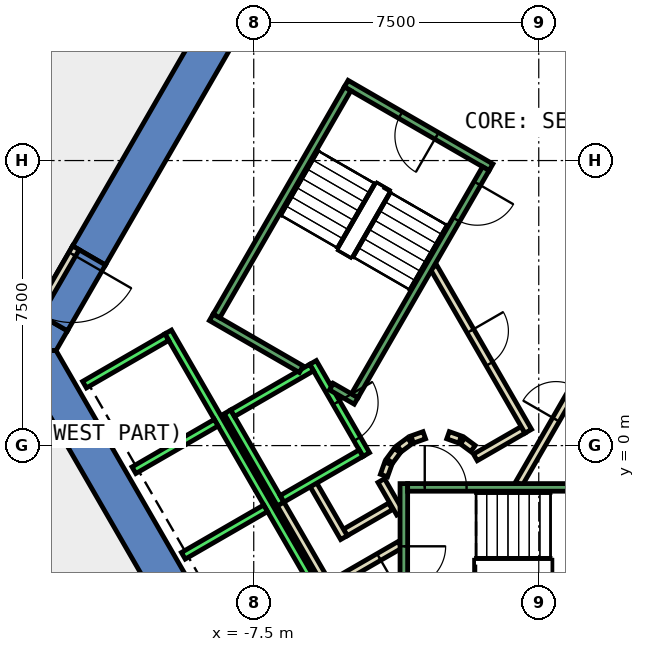
"""IFC4 building model, lengths in metres.
Left out: names, types, materials, properties, quantities, classifications, styles, units other than length and angle.
Written with IfcOpenShell. Run it as: python <this file> out.ifc"""

import sys

from ifc_helpers import new_model, si_unit, direction, frame, frame_2d, origin, place, context, subcontext, project, spatial, polyline, rectangle, outline, extrude, element, fill, save


model = new_model("IFC4")
c1 = context("Model", 3, precision=1e-05, world=origin(), true_north=direction((0.0, 1.0)))
c2 = subcontext(c1, "Body", "Model", "MODEL_VIEW")
j1 = project(units=[si_unit("LENGTHUNIT", "METRE"), si_unit("PLANEANGLEUNIT", "RADIAN")], contexts=[c1])
p1 = place(None, origin())
s1 = spatial("IfcSite", under=j1, at=p1, CompositionType="ELEMENT")
p2 = place(p1, origin())
s2 = spatial("IfcBuilding", under=s1, at=p2, CompositionType="ELEMENT")
p3 = place(p2, frame((0.0, 0.0, 25.0)))
s3 = spatial("IfcBuildingStorey", under=s2, at=p3, CompositionType="ELEMENT", Elevation=25.0)
p4 = place(p3, frame((0.0, 0.0, -0.45)))
e1 = element("IfcWall", 1, at=p4, inside=s3, PredefinedType="SHEAR", context=c2, shape_type="SweptSolid", body=[
    extrude(outline(polyline([(-12.267, 5.252), (-11.402, 4.752), (-6.351, 13.5), (-6.928, 14.5), (-12.267, 5.252)])), origin(), (0.0, 0.0, 1.0), 5.0),
])
p5 = place(p3, frame((0.0, 0.0, -0.45)))
e2 = element("IfcWall", 2, at=p5, inside=s3, PredefinedType="SHEAR", context=c2, shape_type="SweptSolid", body=[
    extrude(outline(polyline([(-12.402, 3.02), (-13.267, 3.52), (-13.856, 2.5), (-12.702, 2.5), (-12.402, 3.02)])), origin(), (0.0, 0.0, 1.0), 5.0),
])
p6 = place(p3, frame((0.0, 0.0, 3.6)))
e3 = element("IfcWall", 3, at=p6, inside=s3, PredefinedType="SHEAR", context=c2, shape_type="SweptSolid", body=[
    extrude(outline(polyline([(-13.267, 3.52), (-12.402, 3.02), (-11.402, 4.752), (-12.267, 5.252), (-13.267, 3.52)])), origin(), (0.0, 0.0, 1.0), 0.95),
])
p7 = place(p3, frame((0.0, 0.0, -0.45)))
e4 = element("IfcWall", 4, at=p7, inside=s3, PredefinedType="SHEAR", context=c2, shape_type="SweptSolid", body=[
    extrude(outline(polyline([(-13.856, 2.5), (-6.928, -9.5), (-6.351, -8.5), (-12.702, 2.5), (-13.856, 2.5)])), origin(), (0.0, 0.0, 1.0), 5.0),
])
p8 = place(p3, frame((-3.9, -1.599, 0.0), z_axis=(0.0, 0.0, 1.0), x_axis=(-0.865969445389, -0.500096910261, 0.0)))
e5 = element("IfcWall", 5, at=p8, inside=s3, PredefinedType="PARTITIONING", context=c2, shape_type="SweptSolid", body=[
    extrude(rectangle(XDim=1.373, YDim=0.2, at=frame_2d((0.687, 0.0))), origin(), (0.0, 0.0, 1.0), 4.55),
])
p9 = place(p3, frame((-5.126, -2.422, 0.0), z_axis=(0.0, 0.0, 1.0), x_axis=(-0.500062241894, 0.865989465428, 0.0)))
e6 = element("IfcWall", 6, at=p9, inside=s3, PredefinedType="PARTITIONING", context=c2, shape_type="SweptSolid", body=[
    extrude(rectangle(XDim=1.7, YDim=0.2, at=frame_2d((0.85, 0.0))), origin(), (0.0, 0.0, 1.0), 4.55),
])
p10 = place(p3, frame((-5.492, -3.788, 0.0), z_axis=(0.0, 0.0, 1.0), x_axis=(-0.500008949224, 0.866020236886, 0.0)))
e7 = element("IfcWall", 7, at=p10, inside=s3, PredefinedType="PARTITIONING", context=c2, shape_type="SweptSolid", body=[
    extrude(rectangle(XDim=2.68, YDim=0.2, at=frame_2d((1.34, 0.0))), origin(), (0.0, 0.0, 1.0), 4.55),
])
p11 = place(p3, frame((-4.145, -0.92, 0.0), z_axis=(0.0, 0.0, 1.0), x_axis=(0.499743786207, -0.866173278362, 0.0)))
e8 = element("IfcWall", 8, at=p11, inside=s3, PredefinedType="PARTITIONING", context=c2, shape_type="SweptSolid", body=[
    extrude(rectangle(XDim=0.991, YDim=0.2, at=frame_2d((0.495, 0.0))), origin(), (0.0, 0.0, 1.0), 4.55),
])
p12 = place(p3, frame((-3.65, -2.61, 0.0), z_axis=(0.0, 0.0, 1.0), x_axis=(-0.866072462134, -0.499918483688, 0.0)))
e9 = element("IfcWall", 9, at=p12, inside=s3, PredefinedType="PARTITIONING", context=c2, shape_type="SweptSolid", body=[
    extrude(rectangle(XDim=2.084, YDim=0.2, at=frame_2d((1.042, 0.0))), origin(), (0.0, 0.0, 1.0), 4.55),
])
p13 = place(p12, frame((0.642, 0.0, 0.0)))
e10 = element("IfcOpeningElement", 10, at=p13, cuts=e9, PredefinedType="OPENING", context=c2, shape_type="SweptSolid", body=[
    extrude(rectangle(XDim=0.9, YDim=2.1, at=frame_2d((0.45, 1.05))), frame((0.0, 0.11, 0.0), z_axis=(0.0, -1.0, 0.0), x_axis=(1.0, 0.0, 0.0)), (0.0, 0.0, 1.0), 0.22),
])
p14 = place(p3, frame((-0.52, -1.0, 0.0), z_axis=(0.0, 0.0, 1.0), x_axis=(0.50011622646, 0.865958290007, 0.0)))
e11 = element("IfcWall", 11, at=p14, inside=s3, PredefinedType="PARTITIONING", context=c2, shape_type="SweptSolid", body=[
    extrude(rectangle(XDim=4.991, YDim=0.2, at=frame_2d((2.496, 0.0))), origin(), (0.0, 0.0, 1.0), 4.55),
])
p15 = place(p14, frame((1.945, 0.0, 0.0)))
e12 = element("IfcOpeningElement", 12, at=p15, cuts=e11, PredefinedType="OPENING", context=c2, shape_type="SweptSolid", body=[
    extrude(rectangle(XDim=1.0, YDim=2.1, at=frame_2d((0.5, 1.05))), frame((0.0, 0.11, 0.0), z_axis=(0.0, -1.0, 0.0), x_axis=(1.0, 0.0, 0.0)), (0.0, 0.0, 1.0), 0.22),
])
p16 = place(p3, frame((-0.412, 0.414, 0.0), z_axis=(0.0, 0.0, 1.0), x_axis=(-0.866017369001, -0.500013916395, 0.0)))
e13 = element("IfcWall", 13, at=p16, inside=s3, PredefinedType="PARTITIONING", context=c2, shape_type="SweptSolid", body=[
    extrude(rectangle(XDim=1.45, YDim=0.2, at=frame_2d((0.725, 0.0))), origin(), (0.0, 0.0, 1.0), 4.55),
])
p17 = place(p3, frame((-1.731, -0.077, 0.0), z_axis=(0.0, 0.0, 1.0), x_axis=(-0.804311165252, 0.594208338422, 0.0)))
e14 = element("IfcWall", 14, at=p17, inside=s3, PredefinedType="PARTITIONING", context=c2, shape_type="SweptSolid", body=[
    extrude(rectangle(XDim=0.338, YDim=0.2, at=frame_2d((0.169, 0.0))), origin(), (0.0, 0.0, 1.0), 4.55),
])
p18 = place(p3, frame((-2.07, 0.16, 0.0), z_axis=(0.0, 0.0, 1.0), x_axis=(-0.942199461132, 0.335052496547, 0.0)))
e15 = element("IfcWall", 15, at=p18, inside=s3, PredefinedType="PARTITIONING", context=c2, shape_type="SweptSolid", body=[
    extrude(rectangle(XDim=0.337, YDim=0.2, at=frame_2d((0.169, 0.0))), origin(), (0.0, 0.0, 1.0), 4.55),
])
p19 = place(p3, frame((-3.012, 0.273, 0.0), z_axis=(0.0, 0.0, 1.0), x_axis=(-0.942280615813, -0.334824194261, 0.0)))
e16 = element("IfcWall", 16, at=p19, inside=s3, PredefinedType="PARTITIONING", context=c2, shape_type="SweptSolid", body=[
    extrude(rectangle(XDim=0.338, YDim=0.2, at=frame_2d((0.169, 0.0))), origin(), (0.0, 0.0, 1.0), 4.55),
])
p20 = place(p3, frame((-3.397, 0.124, 0.0), z_axis=(0.0, 0.0, 1.0), x_axis=(-0.804311165252, -0.594208338422, 0.0)))
e17 = element("IfcWall", 17, at=p20, inside=s3, PredefinedType="PARTITIONING", context=c2, shape_type="SweptSolid", body=[
    extrude(rectangle(XDim=0.338, YDim=0.2, at=frame_2d((0.169, 0.0))), origin(), (0.0, 0.0, 1.0), 4.55),
])
p21 = place(p3, frame((-3.723, -0.131, 0.0), z_axis=(0.0, 0.0, 1.0), x_axis=(-0.594675113454, -0.803966112121, 0.0)))
e18 = element("IfcWall", 18, at=p21, inside=s3, PredefinedType="PARTITIONING", context=c2, shape_type="SweptSolid", body=[
    extrude(rectangle(XDim=0.338, YDim=0.2, at=frame_2d((0.169, 0.0))), origin(), (0.0, 0.0, 1.0), 4.55),
])
p22 = place(p3, frame((-3.96, -0.47, 0.0), z_axis=(0.0, 0.0, 1.0), x_axis=(-0.334824194261, -0.942280615813, 0.0)))
e19 = element("IfcWall", 19, at=p22, inside=s3, PredefinedType="PARTITIONING", context=c2, shape_type="SweptSolid", body=[
    extrude(rectangle(XDim=0.338, YDim=0.2, at=frame_2d((0.169, 0.0))), origin(), (0.0, 0.0, 1.0), 4.55),
])
p23 = place(p3, frame((-2.771, 4.7, 0.0), z_axis=(0.0, 0.0, 1.0), x_axis=(0.499969479948, -0.866043023828, 0.0)))
e20 = element("IfcWall", 20, at=p23, inside=s3, PredefinedType="PARTITIONING", context=c2, shape_type="SweptSolid", body=[
    extrude(rectangle(XDim=4.99, YDim=0.2, at=frame_2d((2.495, 0.0))), origin(), (0.0, 0.0, 1.0), 4.55),
])
p24 = place(p23, frame((1.945, 0.0, 0.0)))
e21 = element("IfcOpeningElement", 21, at=p24, cuts=e20, PredefinedType="OPENING", context=c2, shape_type="SweptSolid", body=[
    extrude(rectangle(XDim=1.0, YDim=2.1, at=frame_2d((0.5, 1.05))), frame((0.0, 0.11, 0.0), z_axis=(0.0, -1.0, 0.0), x_axis=(1.0, 0.0, 0.0)), (0.0, 0.0, 1.0), 0.22),
])
p25 = place(p3, frame((-12.18, 5.202, 0.0), z_axis=(0.0, 0.0, 1.0), x_axis=(-0.50002537861, -0.866010750942, 0.0)))
e22 = element("IfcWall", 22, at=p25, inside=s3, PredefinedType="PARTITIONING", context=c2, shape_type="SweptSolid", body=[
    extrude(rectangle(XDim=2.0, YDim=0.2, at=frame_2d((1.0, 0.0))), origin(), (0.0, 0.0, 1.0), 2.4),
])
p26 = place(p25, frame((0.19, 0.0, 0.0)))
e23 = element("IfcOpeningElement", 23, at=p26, cuts=e22, PredefinedType="OPENING", context=c2, shape_type="SweptSolid", body=[
    extrude(rectangle(XDim=1.8, YDim=2.1, at=frame_2d((0.9, 1.05))), frame((0.0, 0.11, 0.0), z_axis=(0.0, -1.0, 0.0), x_axis=(1.0, 0.0, 0.0)), (0.0, 0.0, 1.0), 0.22),
])
p27 = place(p3, frame((-5.94, 2.188, 0.0), z_axis=(0.0, 0.0, 1.0), x_axis=(0.49994636267, -0.866056369097, 0.0)))
e24 = element("IfcWall", 24, at=p27, inside=s3, PredefinedType="STANDARD", context=c2, shape_type="SweptSolid", body=[
    extrude(rectangle(XDim=2.8, YDim=0.2, at=frame_2d((1.4, 0.0))), origin(), (0.0, 0.0, 1.0), 4.55),
])
p28 = place(p27, frame((1.225, 0.0, 0.0)))
e25 = element("IfcOpeningElement", 25, at=p28, cuts=e24, PredefinedType="OPENING", context=c2, shape_type="SweptSolid", body=[
    extrude(rectangle(XDim=1.1, YDim=2.1, at=frame_2d((0.55, 1.05))), frame((0.0, 0.11, 0.0), z_axis=(0.0, -1.0, 0.0), x_axis=(1.0, 0.0, 0.0)), (0.0, 0.0, 1.0), 0.22),
])
p29 = place(p3, frame((-8.192, 0.888, 0.0), z_axis=(0.0, 0.0, 1.0), x_axis=(0.49994636267, -0.866056369097, 0.0)))
e26 = element("IfcWall", 26, at=p29, inside=s3, PredefinedType="STANDARD", context=c2, shape_type="SweptSolid", body=[
    extrude(rectangle(XDim=2.8, YDim=0.2, at=frame_2d((1.4, 0.0))), origin(), (0.0, 0.0, 1.0), 4.55),
])
for number, where, z_axis, x_axis in (
    (27, (-5.977, 2.052, 0.0), (0.0, 0.0, 1.0), (-0.866, -0.5, 0.0)),
    (28, (-4.677, -0.2, 0.0), (0.0, 0.0, 1.0), (-0.866, -0.5, 0.0)),
):
    element("IfcWall", number, at=place(p3, frame(where, z_axis=z_axis, x_axis=x_axis)), inside=s3, PredefinedType="STANDARD", context=c2, shape_type="SweptSolid", body=[
        extrude(rectangle(XDim=2.399, YDim=0.2, at=frame_2d((1.2, 0.0))), origin(), (0.0, 0.0, 1.0), 4.55),
    ])
p30 = place(p3, frame((-9.751, 2.99, 0.0), z_axis=(0.0, 0.0, 1.0), x_axis=(0.50000090737, -0.866024879913, 0.0)))
e29 = element("IfcWall", 29, at=p30, inside=s3, PredefinedType="STANDARD", context=c2, shape_type="SweptSolid", body=[
    extrude(rectangle(XDim=10.6, YDim=0.2, at=frame_2d((5.3, 0.0))), origin(), (0.0, 0.0, 1.0), 4.55),
])
p31 = place(p3, frame((-9.788, 2.853, 0.0), z_axis=(0.0, 0.0, 1.0), x_axis=(-0.865998541277, -0.500046524342, 0.0)))
e30 = element("IfcWall", 30, at=p31, inside=s3, PredefinedType="STANDARD", context=c2, shape_type="SweptSolid", body=[
    extrude(rectangle(XDim=2.5, YDim=0.2, at=frame_2d((1.25, 0.0))), origin(), (0.0, 0.0, 1.0), 4.55),
])
for number, where, z_axis, x_axis in (
    (31, (-8.488, 0.602, 0.0), (0.0, 0.0, 1.0), (-0.866, -0.5, 0.0)),
    (32, (-7.188, -1.65, 0.0), (0.0, 0.0, 1.0), (-0.866, -0.5, 0.0)),
):
    element("IfcWall", number, at=place(p3, frame(where, z_axis=z_axis, x_axis=x_axis)), inside=s3, PredefinedType="STANDARD", context=c2, shape_type="SweptSolid", body=[
        extrude(rectangle(XDim=2.5, YDim=0.2, at=frame_2d((1.25, 0.0))), origin(), (0.0, 0.0, 1.0), 4.55),
    ])
p32 = place(p3, frame((-3.55, -1.0, 0.0), z_axis=(0.0, 0.0, 1.0), x_axis=(0.0, -1.0, 0.0)))
e33 = element("IfcWall", 33, at=p32, inside=s3, PredefinedType="STANDARD", context=c2, shape_type="SweptSolid", body=[
    extrude(rectangle(XDim=4.4, YDim=0.2, at=frame_2d((2.2, 0.0))), origin(), (0.0, 0.0, 1.0), 4.55),
])
p33 = place(p32, frame((1.65, 0.0, 0.0)))
e34 = element("IfcOpeningElement", 34, at=p33, cuts=e33, PredefinedType="OPENING", context=c2, shape_type="SweptSolid", body=[
    extrude(rectangle(XDim=1.1, YDim=2.2, at=frame_2d((0.55, 1.1))), frame((0.0, 0.11, 0.0), z_axis=(0.0, -1.0, 0.0), x_axis=(1.0, 0.0, 0.0)), (0.0, 0.0, 1.0), 0.22),
])
p34 = place(p3, frame((-3.45, -1.1, 0.0), z_axis=(0.0, 0.0, 1.0), x_axis=(1.0, 0.0, 0.0)))
e35 = element("IfcWall", 35, at=p34, inside=s3, PredefinedType="STANDARD", context=c2, shape_type="SweptSolid", body=[
    extrude(rectangle(XDim=6.9, YDim=0.2, at=frame_2d((3.45, 0.0))), origin(), (0.0, 0.0, 1.0), 4.55),
])
p35 = place(p34, frame((0.45, 0.0, 0.0)))
e36 = element("IfcOpeningElement", 36, at=p35, cuts=e35, PredefinedType="OPENING", context=c2, shape_type="SweptSolid", body=[
    extrude(rectangle(XDim=1.1, YDim=2.2, at=frame_2d((0.55, 1.1))), frame((0.0, 0.11, 0.0), z_axis=(0.0, -1.0, 0.0), x_axis=(1.0, 0.0, 0.0)), (0.0, 0.0, 1.0), 0.22),
])
p36 = place(p3, frame((-1.256, 7.324, 0.0), z_axis=(0.0, 0.0, 1.0), x_axis=(-0.866046073146, 0.499964197906, 0.0)))
e37 = element("IfcWall", 37, at=p36, inside=s3, PredefinedType="STANDARD", context=c2, shape_type="SweptSolid", body=[
    extrude(rectangle(XDim=4.4, YDim=0.2, at=frame_2d((2.2, 0.0))), origin(), (0.0, 0.0, 1.0), 4.55),
])
p37 = place(p36, frame((1.65, 0.0, 0.0)))
e38 = element("IfcOpeningElement", 38, at=p37, cuts=e37, PredefinedType="OPENING", context=c2, shape_type="SweptSolid", body=[
    extrude(rectangle(XDim=1.1, YDim=2.2, at=frame_2d((0.55, 1.1))), frame((0.0, 0.11, 0.0), z_axis=(0.0, -1.0, 0.0), x_axis=(1.0, 0.0, 0.0)), (0.0, 0.0, 1.0), 0.22),
])
p38 = place(p3, frame((-6.25, 2.01, 0.0), z_axis=(0.0, 0.0, 1.0), x_axis=(-0.86611865017, 0.499838457731, 0.0)))
e39 = element("IfcWall", 39, at=p38, inside=s3, PredefinedType="STANDARD", context=c2, shape_type="SweptSolid", body=[
    extrude(rectangle(XDim=2.733, YDim=0.2, at=frame_2d((1.366, 0.0))), origin(), (0.0, 0.0, 1.0), 4.55),
])
p39 = place(p3, frame((-4.806, 1.176, 0.0), z_axis=(0.0, 0.0, 1.0), x_axis=(-0.866558586415, 0.499075361355, 0.0)))
e40 = element("IfcWall", 40, at=p39, inside=s3, PredefinedType="STANDARD", context=c2, shape_type="SweptSolid", body=[
    extrude(rectangle(XDim=0.751, YDim=0.2, at=frame_2d((0.376, 0.0))), origin(), (0.0, 0.0, 1.0), 4.55),
])
p40 = place(p3, frame((-1.393, 7.288, 0.0), z_axis=(0.0, 0.0, 1.0), x_axis=(-0.499963383562, -0.866046543262, 0.0)))
e41 = element("IfcWall", 41, at=p40, inside=s3, PredefinedType="STANDARD", context=c2, shape_type="SweptSolid", body=[
    extrude(rectangle(XDim=6.9, YDim=0.2, at=frame_2d((3.45, 0.0))), origin(), (0.0, 0.0, 1.0), 4.55),
])
p41 = place(p40, frame((0.45, 0.0, 0.0)))
e42 = element("IfcOpeningElement", 42, at=p41, cuts=e41, PredefinedType="OPENING", context=c2, shape_type="SweptSolid", body=[
    extrude(rectangle(XDim=1.1, YDim=2.2, at=frame_2d((0.55, 1.1))), frame((0.0, 0.11, 0.0), z_axis=(0.0, -1.0, 0.0), x_axis=(1.0, 0.0, 0.0)), (0.0, 0.0, 1.0), 0.22),
])
p42 = place(p3, frame((-5.03, 9.388, 0.0), z_axis=(0.0, 0.0, 1.0), x_axis=(-0.499978703459, -0.866037698999, 0.0)))
e43 = element("IfcWall", 43, at=p42, inside=s3, PredefinedType="STANDARD", context=c2, shape_type="SweptSolid", body=[
    extrude(rectangle(XDim=6.9, YDim=0.2, at=frame_2d((3.45, 0.0))), origin(), (0.0, 0.0, 1.0), 4.55),
])
p43 = place(p15, origin())
e44 = element("IfcDoor", 44, at=p43, inside=s3, OperationType="SINGLE_SWING_LEFT", PredefinedType="DOOR", context=c2, shape_type="SweptSolid", body=[
    extrude(rectangle(XDim=1.0, YDim=2.1, at=frame_2d((0.5, 1.05))), frame((0.0, 0.025, 0.0), z_axis=(0.0, -1.0, 0.0), x_axis=(1.0, 0.0, 0.0)), (0.0, 0.0, 1.0), 0.05),
])
fill(e12, e44)
p44 = place(p24, origin())
e45 = element("IfcDoor", 45, at=p44, inside=s3, OperationType="SINGLE_SWING_RIGHT", PredefinedType="DOOR", context=c2, shape_type="SweptSolid", body=[
    extrude(rectangle(XDim=1.0, YDim=2.1, at=frame_2d((0.5, 1.05))), frame((0.0, 0.025, 0.0), z_axis=(0.0, -1.0, 0.0), x_axis=(1.0, 0.0, 0.0)), (0.0, 0.0, 1.0), 0.05),
])
fill(e21, e45)
p45 = place(p13, origin())
e46 = element("IfcDoor", 46, at=p45, inside=s3, OperationType="SINGLE_SWING_LEFT", PredefinedType="DOOR", context=c2, shape_type="SweptSolid", body=[
    extrude(rectangle(XDim=0.9, YDim=2.1, at=frame_2d((0.45, 1.05))), frame((0.0, 0.025, 0.0), z_axis=(0.0, -1.0, 0.0), x_axis=(1.0, 0.0, 0.0)), (0.0, 0.0, 1.0), 0.05),
])
fill(e10, e46)
p46 = place(p26, origin())
e47 = element("IfcDoor", 47, at=p46, inside=s3, OperationType="DOUBLE_DOOR_SINGLE_SWING", PredefinedType="DOOR", context=c2, shape_type="SweptSolid", body=[
    extrude(rectangle(XDim=1.8, YDim=2.1, at=frame_2d((0.9, 1.05))), frame((0.0, 0.025, 0.0), z_axis=(0.0, -1.0, 0.0), x_axis=(1.0, 0.0, 0.0)), (0.0, 0.0, 1.0), 0.05),
])
fill(e23, e47)
p47 = place(p28, origin())
e48 = element("IfcDoor", 48, at=p47, inside=s3, OperationType="SLIDING_TO_LEFT", PredefinedType="DOOR", context=c2, shape_type="SweptSolid", body=[
    extrude(rectangle(XDim=1.1, YDim=2.1, at=frame_2d((0.55, 1.05))), frame((0.0, 0.025, 0.0), z_axis=(0.0, -1.0, 0.0), x_axis=(1.0, 0.0, 0.0)), (0.0, 0.0, 1.0), 0.05),
])
fill(e25, e48)
p48 = place(p35, origin())
e49 = element("IfcDoor", 49, at=p48, inside=s3, OperationType="SINGLE_SWING_LEFT", PredefinedType="DOOR", context=c2, shape_type="SweptSolid", body=[
    extrude(rectangle(XDim=1.1, YDim=2.2, at=frame_2d((0.55, 1.1))), frame((0.0, 0.025, 0.0), z_axis=(0.0, -1.0, 0.0), x_axis=(1.0, 0.0, 0.0)), (0.0, 0.0, 1.0), 0.05),
])
fill(e36, e49)
p49 = place(p33, origin())
e50 = element("IfcDoor", 50, at=p49, inside=s3, OperationType="SINGLE_SWING_LEFT", PredefinedType="DOOR", context=c2, shape_type="SweptSolid", body=[
    extrude(rectangle(XDim=1.1, YDim=2.2, at=frame_2d((0.55, 1.1))), frame((0.0, 0.025, 0.0), z_axis=(0.0, -1.0, 0.0), x_axis=(1.0, 0.0, 0.0)), (0.0, 0.0, 1.0), 0.05),
])
fill(e34, e50)
p50 = place(p41, origin())
e51 = element("IfcDoor", 51, at=p50, inside=s3, OperationType="SINGLE_SWING_LEFT", PredefinedType="DOOR", context=c2, shape_type="SweptSolid", body=[
    extrude(rectangle(XDim=1.1, YDim=2.2, at=frame_2d((0.55, 1.1))), frame((0.0, 0.025, 0.0), z_axis=(0.0, -1.0, 0.0), x_axis=(1.0, 0.0, 0.0)), (0.0, 0.0, 1.0), 0.05),
])
fill(e42, e51)
p51 = place(p37, origin())
e52 = element("IfcDoor", 52, at=p51, inside=s3, OperationType="SINGLE_SWING_LEFT", PredefinedType="DOOR", context=c2, shape_type="SweptSolid", body=[
    extrude(rectangle(XDim=1.1, YDim=2.2, at=frame_2d((0.55, 1.1))), frame((0.0, 0.025, 0.0), z_axis=(0.0, -1.0, 0.0), x_axis=(1.0, 0.0, 0.0)), (0.0, 0.0, 1.0), 0.05),
])
fill(e38, e52)
save(model, sys.argv[1])
